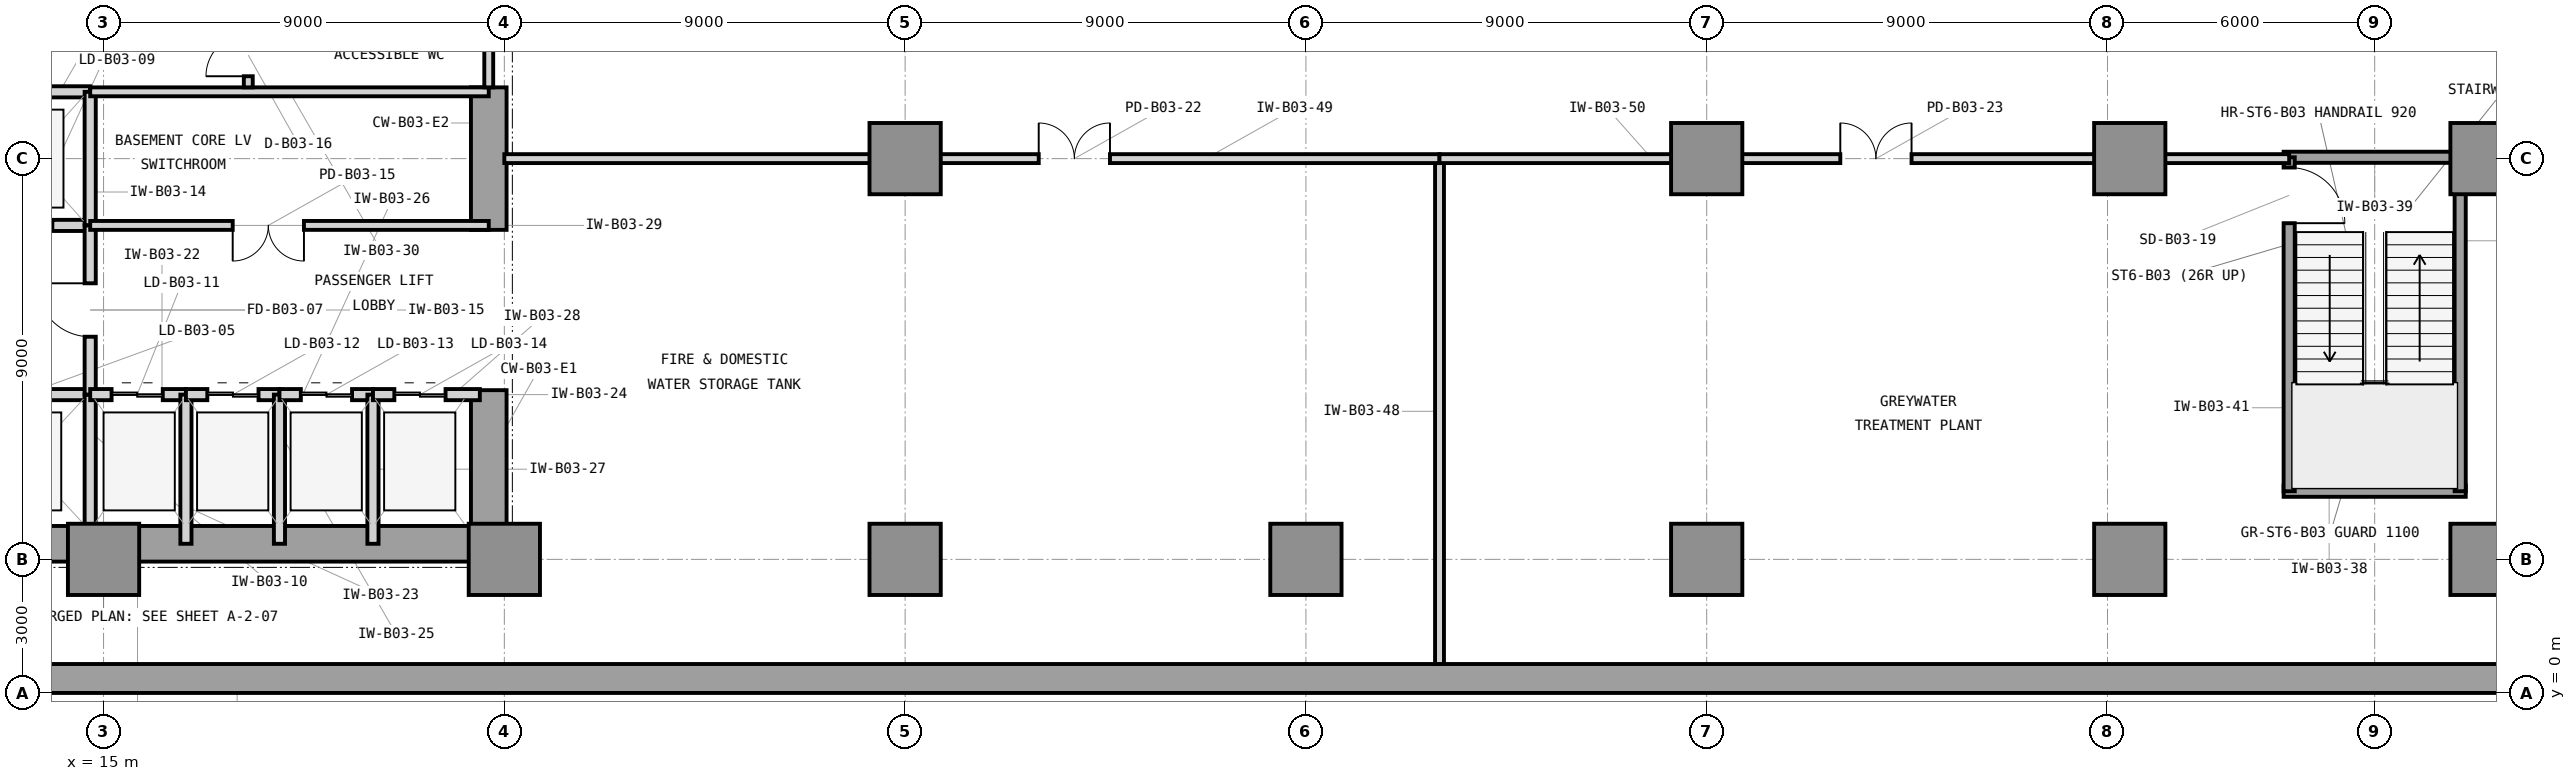
"""IFC4 building model, lengths in metres.
Left out: names, types, materials, properties, quantities, classifications, styles, units other than length and angle.
Written with IfcOpenShell. Run it as: python <this file> out.ifc"""

import sys

from ifc_helpers import new_model, si_unit, direction, frame, frame_2d, origin, origin_2d, place, context, subcontext, project, spatial, rectangle, extrude, element, fill, save


model = new_model("IFC4")
c1 = context("Model", 3, precision=1e-05, world=origin(), true_north=direction((0.0, 1.0)))
c2 = subcontext(c1, "Body", "Model", "MODEL_VIEW")
j1 = project(units=[si_unit("LENGTHUNIT", "METRE"), si_unit("PLANEANGLEUNIT", "RADIAN")], contexts=[c1])
p1 = place(None, origin())
s1 = spatial("IfcSite", under=j1, at=p1, CompositionType="ELEMENT")
p2 = place(p1, origin())
s2 = spatial("IfcBuilding", under=s1, at=p2, CompositionType="ELEMENT")
p3 = place(p2, frame((0.0, 0.0, -13.5)))
s3 = spatial("IfcBuildingStorey", under=s2, at=p3, CompositionType="ELEMENT", Elevation=-13.5)
p4 = place(p3, frame((0.0, 0.325, 0.0), z_axis=(0.0, 0.0, 1.0), x_axis=(1.0, 0.0, 0.0)))
e1 = element("IfcWall", 1, at=p4, inside=s3, PredefinedType="USERDEFINED", context=c2, shape_type="SweptSolid", body=[
    extrude(rectangle(XDim=72.0, YDim=0.65, at=frame_2d((36.0, 0.0))), origin(), (0.0, 0.0, 1.0), 4.5),
])
p5 = place(p3, frame((7.475, 3.35, 0.0), z_axis=(0.0, 0.0, 1.0), x_axis=(1.0, 0.0, 0.0)))
e2 = element("IfcWall", 2, at=p5, inside=s3, PredefinedType="SHEAR", context=c2, shape_type="SweptSolid", body=[
    extrude(rectangle(XDim=16.575, YDim=0.8, at=frame_2d((8.288, 0.0))), origin(), (0.0, 0.0, 1.0), 4.5),
])
p6 = place(p3, frame((23.65, 3.75, 0.0), z_axis=(0.0, 0.0, 1.0), x_axis=(0.0, 1.0, 0.0)))
e3 = element("IfcWall", 3, at=p6, inside=s3, PredefinedType="SHEAR", context=c2, shape_type="SweptSolid", body=[
    extrude(rectangle(XDim=3.05, YDim=0.8, at=frame_2d((1.525, 0.0))), origin(), (0.0, 0.0, 1.0), 4.5),
])
p7 = place(p3, frame((23.65, 10.4, 0.0), z_axis=(0.0, 0.0, 1.0), x_axis=(0.0, 1.0, 0.0)))
e4 = element("IfcWall", 4, at=p7, inside=s3, PredefinedType="SHEAR", context=c2, shape_type="SweptSolid", body=[
    extrude(rectangle(XDim=3.2, YDim=0.8, at=frame_2d((1.6, 0.0))), origin(), (0.0, 0.0, 1.0), 4.5),
])
for number, where, z_axis, x_axis in (
    (5, (15.0, 3.0, 0.0), (0.0, 0.0, 1.0), (1.0, 0.0, 0.0)),
    (6, (24.0, 3.0, 0.0), (0.0, 0.0, 1.0), (1.0, 0.0, 0.0)),
    (7, (33.0, 3.0, 0.0), (0.0, 0.0, 1.0), (1.0, 0.0, 0.0)),
    (8, (33.0, 12.0, 0.0), (0.0, 0.0, 1.0), (1.0, 0.0, 0.0)),
    (9, (42.0, 3.0, 0.0), (0.0, 0.0, 1.0), (1.0, 0.0, 0.0)),
    (10, (51.0, 3.0, 0.0), (0.0, 0.0, 1.0), (1.0, 0.0, 0.0)),
    (11, (51.0, 12.0, 0.0), (0.0, 0.0, 1.0), (1.0, 0.0, 0.0)),
    (12, (60.5, 3.0, 0.0), (0.0, 0.0, 1.0), (1.0, 0.0, 0.0)),
    (13, (60.5, 12.0, 0.0), (0.0, 0.0, 1.0), (1.0, 0.0, 0.0)),
    (14, (68.5, 3.0, 0.0), (0.0, 0.0, 1.0), (1.0, 0.0, 0.0)),
    (15, (68.5, 12.0, 0.0), (0.0, 0.0, 1.0), (1.0, 0.0, 0.0)),
):
    element("IfcColumn", number, at=place(p3, frame(where, z_axis=z_axis, x_axis=x_axis)), inside=s3, PredefinedType="COLUMN", context=c2, shape_type="SweptSolid", body=[
        extrude(rectangle(XDim=1.6, YDim=1.6, at=origin_2d()), origin(), (0.0, 0.0, 1.0), 4.5),
    ])
p8 = place(p3, frame((11.82, 6.7, 0.0), z_axis=(0.0, 0.0, 1.0), x_axis=(1.0, 0.0, 0.0)))
e16 = element("IfcWall", 16, at=p8, inside=s3, PredefinedType="PARTITIONING", context=c2, shape_type="SweptSolid", body=[
    extrude(rectangle(XDim=2.88, YDim=0.25, at=frame_2d((1.44, 0.0))), origin(), (0.0, 0.0, 1.0), 3.523),
])
p9 = place(p8, frame((0.85, 0.0, 0.0)))
e17 = element("IfcOpeningElement", 17, at=p9, cuts=e16, PredefinedType="OPENING", context=c2, shape_type="SweptSolid", body=[
    extrude(rectangle(XDim=1.1, YDim=2.25, at=frame_2d((0.55, 1.125))), frame((0.0, 0.135, 0.0), z_axis=(0.0, -1.0, 0.0), x_axis=(1.0, 0.0, 0.0)), (0.0, 0.0, 1.0), 0.27),
])
p10 = place(p3, frame((14.7, 3.35, 0.0), z_axis=(0.0, 0.0, 1.0), x_axis=(0.0, 1.0, 0.0)))
e18 = element("IfcWall", 18, at=p10, inside=s3, PredefinedType="PARTITIONING", context=c2, shape_type="SweptSolid", body=[
    extrude(rectangle(XDim=3.35, YDim=0.25, at=frame_2d((1.675, 0.0))), origin(), (0.0, 0.0, 1.0), 4.14),
])
p11 = place(p3, frame((11.95, 10.5, 0.0), z_axis=(0.0, 0.0, 1.0), x_axis=(1.0, 0.0, 0.0)))
e19 = element("IfcWall", 19, at=p11, inside=s3, PredefinedType="PARTITIONING", context=c2, shape_type="SweptSolid", body=[
    extrude(rectangle(XDim=2.75, YDim=0.25, at=frame_2d((1.375, 0.0))), origin(), (0.0, 0.0, 1.0), 3.523),
])
p12 = place(p11, frame((0.8, 0.0, 0.0)))
e20 = element("IfcOpeningElement", 20, at=p12, cuts=e19, PredefinedType="OPENING", context=c2, shape_type="SweptSolid", body=[
    extrude(rectangle(XDim=1.1, YDim=2.25, at=frame_2d((0.55, 1.125))), frame((0.0, 0.135, 0.0), z_axis=(0.0, -1.0, 0.0), x_axis=(1.0, 0.0, 0.0)), (0.0, 0.0, 1.0), 0.27),
])
p13 = place(p3, frame((11.95, 13.5, 0.0), z_axis=(0.0, 0.0, 1.0), x_axis=(1.0, 0.0, 0.0)))
e21 = element("IfcWall", 21, at=p13, inside=s3, PredefinedType="PARTITIONING", context=c2, shape_type="SweptSolid", body=[
    extrude(rectangle(XDim=2.75, YDim=0.25, at=frame_2d((1.375, 0.0))), origin(), (0.0, 0.0, 1.0), 3.523),
])
p14 = place(p3, frame((14.7, 10.5, 0.0), z_axis=(0.0, 0.0, 1.0), x_axis=(0.0, 1.0, 0.0)))
e22 = element("IfcWall", 22, at=p14, inside=s3, PredefinedType="PARTITIONING", context=c2, shape_type="SweptSolid", body=[
    extrude(rectangle(XDim=3.0, YDim=0.25, at=frame_2d((1.5, 0.0))), origin(), (0.0, 0.0, 1.0), 4.14),
])
p15 = place(p3, frame((14.7, 6.7, 0.0), z_axis=(0.0, 0.0, 1.0), x_axis=(0.0, 1.0, 0.0)))
e23 = element("IfcWall", 23, at=p15, inside=s3, PredefinedType="PARTITIONING", context=c2, shape_type="SweptSolid", body=[
    extrude(rectangle(XDim=3.8, YDim=0.25, at=frame_2d((1.9, 0.0))), origin(), (0.0, 0.0, 1.0), 4.14),
])
p16 = place(p15, frame((1.3, 0.0, 0.0)))
e24 = element("IfcOpeningElement", 24, at=p16, cuts=e23, PredefinedType="OPENING", context=c2, shape_type="SweptSolid", body=[
    extrude(rectangle(XDim=1.2, YDim=2.2, at=frame_2d((0.6, 1.1))), frame((0.0, 0.135, 0.0), z_axis=(0.0, -1.0, 0.0), x_axis=(1.0, 0.0, 0.0)), (0.0, 0.0, 1.0), 0.27),
])
p17 = place(p3, frame((14.7, 6.7, 0.0), z_axis=(0.0, 0.0, 1.0), x_axis=(1.0, 0.0, 0.0)))
e25 = element("IfcWall", 25, at=p17, inside=s3, PredefinedType="PARTITIONING", context=c2, shape_type="SweptSolid", body=[
    extrude(rectangle(XDim=2.15, YDim=0.25, at=frame_2d((1.075, 0.0))), origin(), (0.0, 0.0, 1.0), 3.523),
])
p18 = place(p17, frame((0.48, 0.0, 0.0)))
e26 = element("IfcOpeningElement", 26, at=p18, cuts=e25, PredefinedType="OPENING", context=c2, shape_type="SweptSolid", body=[
    extrude(rectangle(XDim=1.15, YDim=2.25, at=frame_2d((0.575, 1.125))), frame((0.0, 0.135, 0.0), z_axis=(0.0, -1.0, 0.0), x_axis=(1.0, 0.0, 0.0)), (0.0, 0.0, 1.0), 0.27),
])
p19 = place(p3, frame((16.85, 3.35, 0.0), z_axis=(0.0, 0.0, 1.0), x_axis=(0.0, 1.0, 0.0)))
e27 = element("IfcWall", 27, at=p19, inside=s3, PredefinedType="PARTITIONING", context=c2, shape_type="SweptSolid", body=[
    extrude(rectangle(XDim=3.35, YDim=0.25, at=frame_2d((1.675, 0.0))), origin(), (0.0, 0.0, 1.0), 4.14),
])
p20 = place(p3, frame((16.85, 6.7, 0.0), z_axis=(0.0, 0.0, 1.0), x_axis=(1.0, 0.0, 0.0)))
e28 = element("IfcWall", 28, at=p20, inside=s3, PredefinedType="PARTITIONING", context=c2, shape_type="SweptSolid", body=[
    extrude(rectangle(XDim=2.1, YDim=0.25, at=frame_2d((1.05, 0.0))), origin(), (0.0, 0.0, 1.0), 3.523),
])
p21 = place(p20, frame((0.48, 0.0, 0.0)))
e29 = element("IfcOpeningElement", 29, at=p21, cuts=e28, PredefinedType="OPENING", context=c2, shape_type="SweptSolid", body=[
    extrude(rectangle(XDim=1.15, YDim=2.25, at=frame_2d((0.575, 1.125))), frame((0.0, 0.135, 0.0), z_axis=(0.0, -1.0, 0.0), x_axis=(1.0, 0.0, 0.0)), (0.0, 0.0, 1.0), 0.27),
])
p22 = place(p3, frame((18.95, 3.35, 0.0), z_axis=(0.0, 0.0, 1.0), x_axis=(0.0, 1.0, 0.0)))
e30 = element("IfcWall", 30, at=p22, inside=s3, PredefinedType="PARTITIONING", context=c2, shape_type="SweptSolid", body=[
    extrude(rectangle(XDim=3.35, YDim=0.25, at=frame_2d((1.675, 0.0))), origin(), (0.0, 0.0, 1.0), 4.14),
])
p23 = place(p3, frame((18.95, 6.7, 0.0), z_axis=(0.0, 0.0, 1.0), x_axis=(1.0, 0.0, 0.0)))
e31 = element("IfcWall", 31, at=p23, inside=s3, PredefinedType="PARTITIONING", context=c2, shape_type="SweptSolid", body=[
    extrude(rectangle(XDim=2.1, YDim=0.25, at=frame_2d((1.05, 0.0))), origin(), (0.0, 0.0, 1.0), 3.523),
])
p24 = place(p23, frame((0.48, 0.0, 0.0)))
e32 = element("IfcOpeningElement", 32, at=p24, cuts=e31, PredefinedType="OPENING", context=c2, shape_type="SweptSolid", body=[
    extrude(rectangle(XDim=1.15, YDim=2.25, at=frame_2d((0.575, 1.125))), frame((0.0, 0.135, 0.0), z_axis=(0.0, -1.0, 0.0), x_axis=(1.0, 0.0, 0.0)), (0.0, 0.0, 1.0), 0.27),
])
p25 = place(p3, frame((21.05, 3.35, 0.0), z_axis=(0.0, 0.0, 1.0), x_axis=(0.0, 1.0, 0.0)))
e33 = element("IfcWall", 33, at=p25, inside=s3, PredefinedType="PARTITIONING", context=c2, shape_type="SweptSolid", body=[
    extrude(rectangle(XDim=3.35, YDim=0.25, at=frame_2d((1.675, 0.0))), origin(), (0.0, 0.0, 1.0), 4.14),
])
p26 = place(p3, frame((21.05, 6.7, 0.0), z_axis=(0.0, 0.0, 1.0), x_axis=(1.0, 0.0, 0.0)))
e34 = element("IfcWall", 34, at=p26, inside=s3, PredefinedType="PARTITIONING", context=c2, shape_type="SweptSolid", body=[
    extrude(rectangle(XDim=2.4, YDim=0.25, at=frame_2d((1.2, 0.0))), origin(), (0.0, 0.0, 1.0), 3.523),
])
p27 = place(p26, frame((0.48, 0.0, 0.0)))
e35 = element("IfcOpeningElement", 35, at=p27, cuts=e34, PredefinedType="OPENING", context=c2, shape_type="SweptSolid", body=[
    extrude(rectangle(XDim=1.15, YDim=2.25, at=frame_2d((0.575, 1.125))), frame((0.0, 0.135, 0.0), z_axis=(0.0, -1.0, 0.0), x_axis=(1.0, 0.0, 0.0)), (0.0, 0.0, 1.0), 0.27),
])
p28 = place(p3, frame((14.7, 10.5, 0.0), z_axis=(0.0, 0.0, 1.0), x_axis=(1.0, 0.0, 0.0)))
e36 = element("IfcWall", 36, at=p28, inside=s3, PredefinedType="PARTITIONING", context=c2, shape_type="SweptSolid", body=[
    extrude(rectangle(XDim=8.95, YDim=0.2, at=frame_2d((4.475, 0.0))), origin(), (0.0, 0.0, 1.0), 3.523),
])
p29 = place(p28, frame((3.2, 0.0, 0.0)))
e37 = element("IfcOpeningElement", 37, at=p29, cuts=e36, PredefinedType="OPENING", context=c2, shape_type="SweptSolid", body=[
    extrude(rectangle(XDim=1.6, YDim=2.3, at=frame_2d((0.8, 1.15))), frame((0.0, 0.11, 0.0), z_axis=(0.0, -1.0, 0.0), x_axis=(1.0, 0.0, 0.0)), (0.0, 0.0, 1.0), 0.22),
])
p30 = place(p3, frame((14.7, 13.5, 0.0), z_axis=(0.0, 0.0, 1.0), x_axis=(1.0, 0.0, 0.0)))
e38 = element("IfcWall", 38, at=p30, inside=s3, PredefinedType="PARTITIONING", context=c2, shape_type="SweptSolid", body=[
    extrude(rectangle(XDim=8.95, YDim=0.2, at=frame_2d((4.475, 0.0))), origin(), (0.0, 0.0, 1.0), 3.523),
])
p31 = place(p3, frame((18.25, 13.6, 0.0), z_axis=(0.0, 0.0, 1.0), x_axis=(0.0, 1.0, 0.0)))
e39 = element("IfcWall", 39, at=p31, inside=s3, PredefinedType="PARTITIONING", context=c2, shape_type="SweptSolid", body=[
    extrude(rectangle(XDim=3.0, YDim=0.2, at=frame_2d((1.5, 0.0))), origin(), (0.0, 0.0, 1.0), 4.14),
])
p32 = place(p31, frame((0.25, 0.0, 0.0)))
e40 = element("IfcOpeningElement", 40, at=p32, cuts=e39, PredefinedType="OPENING", context=c2, shape_type="SweptSolid", body=[
    extrude(rectangle(XDim=0.95, YDim=2.1, at=frame_2d((0.475, 1.05))), frame((0.0, 0.11, 0.0), z_axis=(0.0, -1.0, 0.0), x_axis=(1.0, 0.0, 0.0)), (0.0, 0.0, 1.0), 0.22),
])
p33 = place(p31, frame((1.8, 0.0, 0.0)))
e41 = element("IfcOpeningElement", 41, at=p33, cuts=e39, PredefinedType="OPENING", context=c2, shape_type="SweptSolid", body=[
    extrude(rectangle(XDim=0.95, YDim=2.1, at=frame_2d((0.475, 1.05))), frame((0.0, 0.11, 0.0), z_axis=(0.0, -1.0, 0.0), x_axis=(1.0, 0.0, 0.0)), (0.0, 0.0, 1.0), 0.22),
])
p34 = place(p3, frame((23.65, 13.6, 0.0), z_axis=(0.0, 0.0, 1.0), x_axis=(0.0, 1.0, 0.0)))
e42 = element("IfcWall", 42, at=p34, inside=s3, PredefinedType="PARTITIONING", context=c2, shape_type="SweptSolid", body=[
    extrude(rectangle(XDim=3.0, YDim=0.2, at=frame_2d((1.5, 0.0))), origin(), (0.0, 0.0, 1.0), 4.14),
])
for number, where, z_axis, x_axis in (
    (43, (63.955, 4.53, 0.0), (0.0, 0.0, 1.0), (1.0, 0.0, 0.0)),
    (44, (63.955, 12.03, 0.0), (0.0, 0.0, 1.0), (1.0, 0.0, 0.0)),
):
    element("IfcWall", number, at=place(p3, frame(where, z_axis=z_axis, x_axis=x_axis)), inside=s3, PredefinedType="SHEAR", context=c2, shape_type="SweptSolid", body=[
        extrude(rectangle(XDim=4.09, YDim=0.25, at=frame_2d((2.045, 0.0))), origin(), (0.0, 0.0, 1.0), 4.5),
    ])
p35 = place(p3, frame((67.92, 4.53, 0.0), z_axis=(0.0, 0.0, 1.0), x_axis=(0.0, 1.0, 0.0)))
e45 = element("IfcWall", 45, at=p35, inside=s3, PredefinedType="SHEAR", context=c2, shape_type="SweptSolid", body=[
    extrude(rectangle(XDim=7.5, YDim=0.25, at=frame_2d((3.75, 0.0))), origin(), (0.0, 0.0, 1.0), 4.5),
])
p36 = place(p3, frame((64.08, 4.53, 0.0), z_axis=(0.0, 0.0, 1.0), x_axis=(0.0, 1.0, 0.0)))
e46 = element("IfcWall", 46, at=p36, inside=s3, PredefinedType="SHEAR", context=c2, shape_type="SweptSolid", body=[
    extrude(rectangle(XDim=7.5, YDim=0.25, at=frame_2d((3.75, 0.0))), origin(), (0.0, 0.0, 1.0), 4.5),
])
p37 = place(p36, frame((6.02, 0.0, 0.0)))
e47 = element("IfcOpeningElement", 47, at=p37, cuts=e46, PredefinedType="OPENING", context=c2, shape_type="SweptSolid", body=[
    extrude(rectangle(XDim=1.25, YDim=2.2, at=frame_2d((0.625, 1.1))), frame((0.0, 0.135, 0.0), z_axis=(0.0, -1.0, 0.0), x_axis=(1.0, 0.0, 0.0)), (0.0, 0.0, 1.0), 0.27),
])
p38 = place(p3, frame((45.0, 0.65, 0.0), z_axis=(0.0, 0.0, 1.0), x_axis=(0.0, 1.0, 0.0)))
e48 = element("IfcWall", 48, at=p38, inside=s3, PredefinedType="PARTITIONING", context=c2, shape_type="SweptSolid", body=[
    extrude(rectangle(XDim=11.35, YDim=0.2, at=frame_2d((5.675, 0.0))), origin(), (0.0, 0.0, 1.0), 4.14),
])
p39 = place(p3, frame((24.0, 12.0, 0.0), z_axis=(0.0, 0.0, 1.0), x_axis=(1.0, 0.0, 0.0)))
e49 = element("IfcWall", 49, at=p39, inside=s3, PredefinedType="PARTITIONING", context=c2, shape_type="SweptSolid", body=[
    extrude(rectangle(XDim=21.0, YDim=0.2, at=frame_2d((10.5, 0.0))), origin(), (0.0, 0.0, 1.0), 3.2),
])
p40 = place(p39, frame((12.0, 0.0, 0.0)))
e50 = element("IfcOpeningElement", 50, at=p40, cuts=e49, PredefinedType="OPENING", context=c2, shape_type="SweptSolid", body=[
    extrude(rectangle(XDim=1.6, YDim=2.3, at=frame_2d((0.8, 1.15))), frame((0.0, 0.11, 0.0), z_axis=(0.0, -1.0, 0.0), x_axis=(1.0, 0.0, 0.0)), (0.0, 0.0, 1.0), 0.22),
])
p41 = place(p3, frame((45.0, 12.0, 0.0), z_axis=(0.0, 0.0, 1.0), x_axis=(1.0, 0.0, 0.0)))
e51 = element("IfcWall", 51, at=p41, inside=s3, PredefinedType="PARTITIONING", context=c2, shape_type="SweptSolid", body=[
    extrude(rectangle(XDim=19.08, YDim=0.2, at=frame_2d((9.54, 0.0))), origin(), (0.0, 0.0, 1.0), 3.2),
])
p42 = place(p41, frame((9.0, 0.0, 0.0)))
e52 = element("IfcOpeningElement", 52, at=p42, cuts=e51, PredefinedType="OPENING", context=c2, shape_type="SweptSolid", body=[
    extrude(rectangle(XDim=1.6, YDim=2.3, at=frame_2d((0.8, 1.15))), frame((0.0, 0.11, 0.0), z_axis=(0.0, -1.0, 0.0), x_axis=(1.0, 0.0, 0.0)), (0.0, 0.0, 1.0), 0.22),
])
p43 = place(p16, origin())
e53 = element("IfcDoor", 53, at=p43, inside=s3, OperationType="SINGLE_SWING_RIGHT", PredefinedType="DOOR", context=c2, shape_type="SweptSolid", body=[
    extrude(rectangle(XDim=1.2, YDim=2.2, at=frame_2d((0.6, 1.1))), frame((0.0, 0.025, 0.0), z_axis=(0.0, -1.0, 0.0), x_axis=(1.0, 0.0, 0.0)), (0.0, 0.0, 1.0), 0.05),
])
fill(e24, e53)
p44 = place(p18, origin())
e54 = element("IfcDoor", 54, at=p44, inside=s3, OperationType="DOUBLE_DOOR_SLIDING", PredefinedType="DOOR", context=c2, shape_type="SweptSolid", body=[
    extrude(rectangle(XDim=1.15, YDim=2.25, at=frame_2d((0.575, 1.125))), frame((0.0, 0.025, 0.0), z_axis=(0.0, -1.0, 0.0), x_axis=(1.0, 0.0, 0.0)), (0.0, 0.0, 1.0), 0.05),
])
fill(e26, e54)
p45 = place(p21, origin())
e55 = element("IfcDoor", 55, at=p45, inside=s3, OperationType="DOUBLE_DOOR_SLIDING", PredefinedType="DOOR", context=c2, shape_type="SweptSolid", body=[
    extrude(rectangle(XDim=1.15, YDim=2.25, at=frame_2d((0.575, 1.125))), frame((0.0, 0.025, 0.0), z_axis=(0.0, -1.0, 0.0), x_axis=(1.0, 0.0, 0.0)), (0.0, 0.0, 1.0), 0.05),
])
fill(e29, e55)
p46 = place(p24, origin())
e56 = element("IfcDoor", 56, at=p46, inside=s3, OperationType="DOUBLE_DOOR_SLIDING", PredefinedType="DOOR", context=c2, shape_type="SweptSolid", body=[
    extrude(rectangle(XDim=1.15, YDim=2.25, at=frame_2d((0.575, 1.125))), frame((0.0, 0.025, 0.0), z_axis=(0.0, -1.0, 0.0), x_axis=(1.0, 0.0, 0.0)), (0.0, 0.0, 1.0), 0.05),
])
fill(e32, e56)
p47 = place(p27, origin())
e57 = element("IfcDoor", 57, at=p47, inside=s3, OperationType="DOUBLE_DOOR_SLIDING", PredefinedType="DOOR", context=c2, shape_type="SweptSolid", body=[
    extrude(rectangle(XDim=1.15, YDim=2.25, at=frame_2d((0.575, 1.125))), frame((0.0, 0.025, 0.0), z_axis=(0.0, -1.0, 0.0), x_axis=(1.0, 0.0, 0.0)), (0.0, 0.0, 1.0), 0.05),
])
fill(e35, e57)
p48 = place(p29, frame((1.6, 0.0, 0.0), z_axis=(0.0, 0.0, 1.0), x_axis=(-1.0, 0.0, 0.0)))
e58 = element("IfcDoor", 58, at=p48, inside=s3, OperationType="DOUBLE_DOOR_SINGLE_SWING", PredefinedType="DOOR", context=c2, shape_type="SweptSolid", body=[
    extrude(rectangle(XDim=1.6, YDim=2.3, at=frame_2d((0.8, 1.15))), frame((0.0, 0.025, 0.0), z_axis=(0.0, -1.0, 0.0), x_axis=(1.0, 0.0, 0.0)), (0.0, 0.0, 1.0), 0.05),
])
fill(e37, e58)
p49 = place(p32, origin())
e59 = element("IfcDoor", 59, at=p49, inside=s3, OperationType="SINGLE_SWING_LEFT", PredefinedType="DOOR", context=c2, shape_type="SweptSolid", body=[
    extrude(rectangle(XDim=0.95, YDim=2.1, at=frame_2d((0.475, 1.05))), frame((0.0, 0.025, 0.0), z_axis=(0.0, -1.0, 0.0), x_axis=(1.0, 0.0, 0.0)), (0.0, 0.0, 1.0), 0.05),
])
fill(e40, e59)
p50 = place(p37, frame((1.25, 0.0, 0.0), z_axis=(0.0, 0.0, 1.0), x_axis=(-1.0, 0.0, 0.0)))
e60 = element("IfcDoor", 60, at=p50, inside=s3, OperationType="SINGLE_SWING_RIGHT", PredefinedType="DOOR", context=c2, shape_type="SweptSolid", body=[
    extrude(rectangle(XDim=1.25, YDim=2.2, at=frame_2d((0.625, 1.1))), frame((0.0, 0.025, 0.0), z_axis=(0.0, -1.0, 0.0), x_axis=(1.0, 0.0, 0.0)), (0.0, 0.0, 1.0), 0.05),
])
fill(e47, e60)
p51 = place(p40, origin())
e61 = element("IfcDoor", 61, at=p51, inside=s3, OperationType="DOUBLE_DOOR_SINGLE_SWING", PredefinedType="DOOR", context=c2, shape_type="SweptSolid", body=[
    extrude(rectangle(XDim=1.6, YDim=2.3, at=frame_2d((0.8, 1.15))), frame((0.0, 0.025, 0.0), z_axis=(0.0, -1.0, 0.0), x_axis=(1.0, 0.0, 0.0)), (0.0, 0.0, 1.0), 0.05),
])
fill(e50, e61)
p52 = place(p42, origin())
e62 = element("IfcDoor", 62, at=p52, inside=s3, OperationType="DOUBLE_DOOR_SINGLE_SWING", PredefinedType="DOOR", context=c2, shape_type="SweptSolid", body=[
    extrude(rectangle(XDim=1.6, YDim=2.3, at=frame_2d((0.8, 1.15))), frame((0.0, 0.025, 0.0), z_axis=(0.0, -1.0, 0.0), x_axis=(1.0, 0.0, 0.0)), (0.0, 0.0, 1.0), 0.05),
])
fill(e52, e62)
save(model, sys.argv[1])
